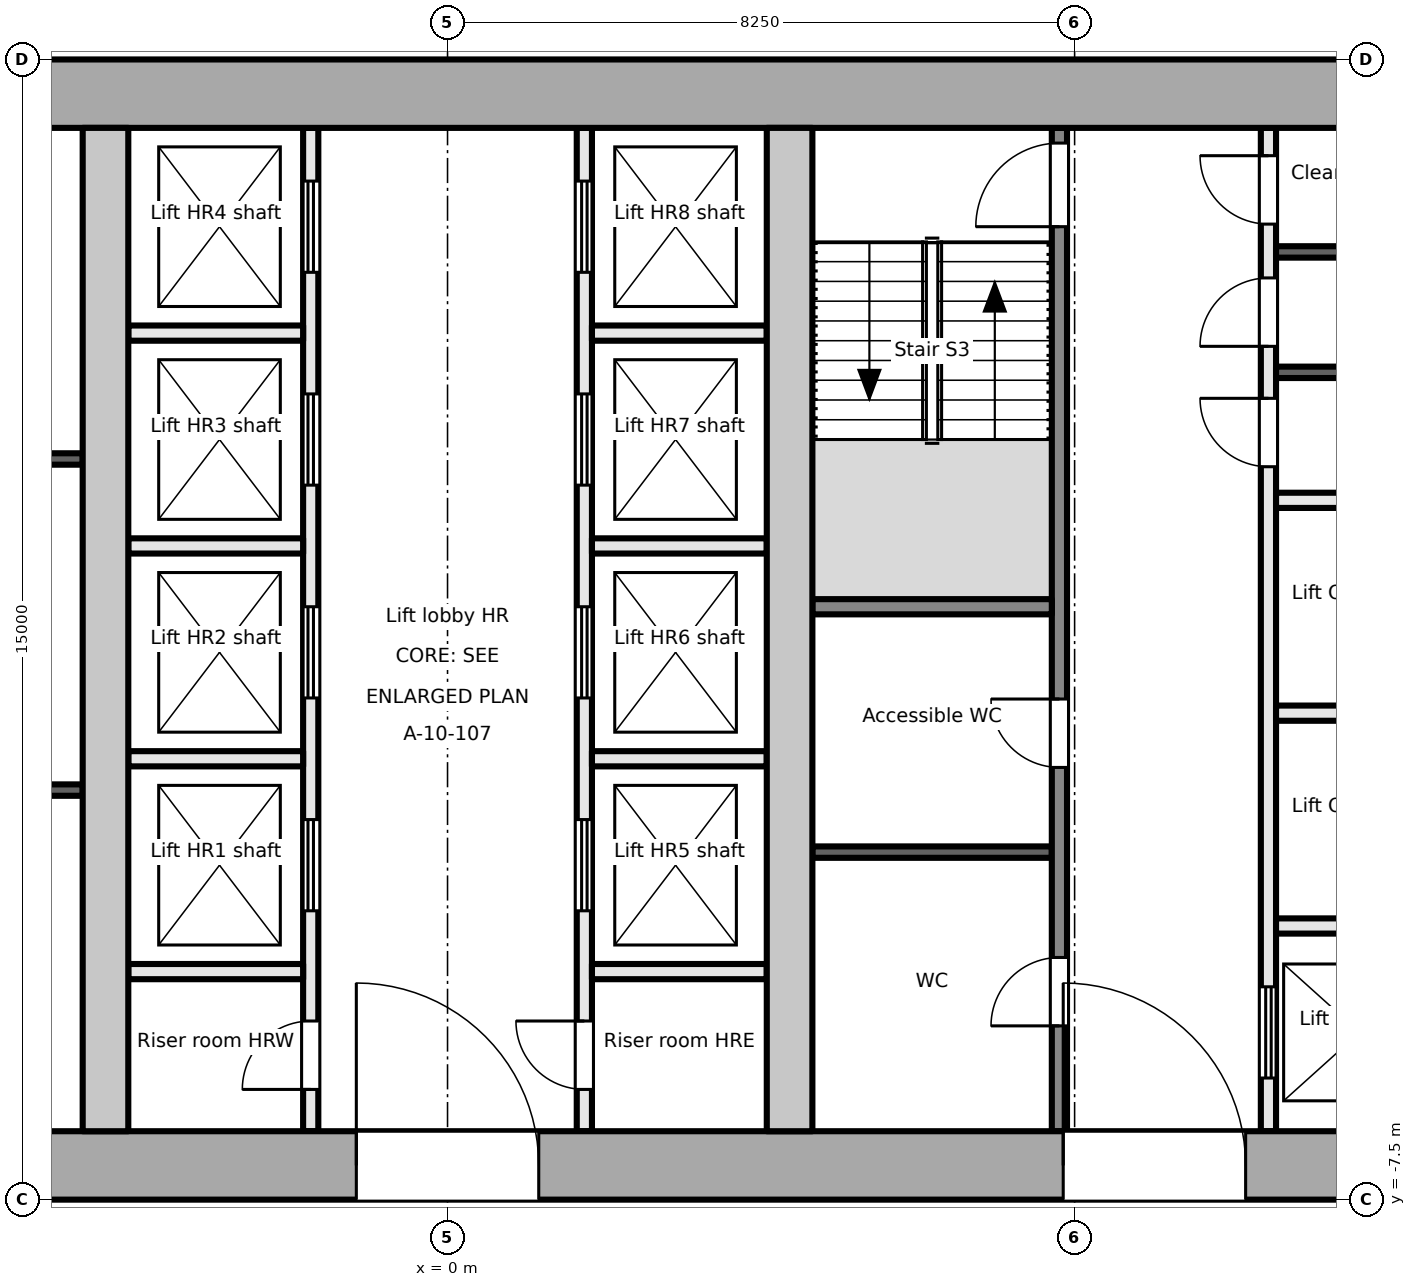
"""IFC4 building model, lengths in metres.
Left out: names, types, materials, properties, quantities, classifications, styles, units other than length and angle.
Written with IfcOpenShell. Run it as: python <this file> out.ifc"""

import sys

from ifc_helpers import new_model, si_unit, direction, frame, frame_2d, origin, place, context, subcontext, project, spatial, rectangle, extrude, element, fill, save


model = new_model("IFC4")
c1 = context("Model", 3, precision=1e-05, world=origin(), true_north=direction((0.0, 1.0)))
c2 = subcontext(c1, "Body", "Model", "MODEL_VIEW")
j1 = project(units=[si_unit("LENGTHUNIT", "METRE"), si_unit("PLANEANGLEUNIT", "RADIAN")], contexts=[c1])
p1 = place(None, origin())
s1 = spatial("IfcSite", under=j1, at=p1, CompositionType="ELEMENT")
p2 = place(p1, origin())
s2 = spatial("IfcBuilding", under=s1, at=p2, CompositionType="ELEMENT")
p3 = place(p2, frame((0.0, 0.0, 221.3)))
s3 = spatial("IfcBuildingStorey", under=s2, at=p3, CompositionType="ELEMENT", Elevation=221.3)
p4 = place(p3, frame((-18.0, -7.05, -0.2), z_axis=(0.0, 0.0, 1.0), x_axis=(1.0, 0.0, 0.0)))
e1 = element("IfcWall", 1, at=p4, inside=s3, PredefinedType="SHEAR", context=c2, shape_type="SweptSolid", body=[
    extrude(rectangle(XDim=36.0, YDim=0.9, at=frame_2d((18.0, 0.0))), origin(), (0.0, 0.0, 1.0), 3.9),
])
p5 = place(p4, frame((4.9, 0.0, 0.2)))
e2 = element("IfcOpeningElement", 2, at=p5, cuts=e1, PredefinedType="OPENING", context=c2, shape_type="SweptSolid", body=[
    extrude(rectangle(XDim=1.8, YDim=2.1, at=frame_2d((0.9, 1.05))), frame((0.0, 0.46, 0.0), z_axis=(0.0, -1.0, 0.0), x_axis=(1.0, 0.0, 0.0)), (0.0, 0.0, 1.0), 0.921),
])
p6 = place(p4, frame((16.8, 0.0, 0.2)))
e3 = element("IfcOpeningElement", 3, at=p6, cuts=e1, PredefinedType="OPENING", context=c2, shape_type="SweptSolid", body=[
    extrude(rectangle(XDim=2.4, YDim=2.1, at=frame_2d((1.2, 1.05))), frame((0.0, 0.46, 0.0), z_axis=(0.0, -1.0, 0.0), x_axis=(1.0, 0.0, 0.0)), (0.0, 0.0, 1.0), 0.921),
])
p7 = place(p4, frame((26.1, 0.0, 0.2)))
e4 = element("IfcOpeningElement", 4, at=p7, cuts=e1, PredefinedType="OPENING", context=c2, shape_type="SweptSolid", body=[
    extrude(rectangle(XDim=2.4, YDim=2.1, at=frame_2d((1.2, 1.05))), frame((0.0, 0.46, 0.0), z_axis=(0.0, -1.0, 0.0), x_axis=(1.0, 0.0, 0.0)), (0.0, 0.0, 1.0), 0.921),
])
p8 = place(p3, frame((-18.0, 7.05, -0.2), z_axis=(0.0, 0.0, 1.0), x_axis=(1.0, 0.0, 0.0)))
e5 = element("IfcWall", 5, at=p8, inside=s3, PredefinedType="SHEAR", context=c2, shape_type="SweptSolid", body=[
    extrude(rectangle(XDim=36.0, YDim=0.9, at=frame_2d((18.0, 0.0))), origin(), (0.0, 0.0, 1.0), 3.9),
])
for number, where, z_axis, x_axis in (
    (6, (-4.5, -6.6, -0.2), (0.0, 0.0, 1.0), (0.0, 1.0, 0.0)),
    (7, (4.5, -6.6, -0.2), (0.0, 0.0, 1.0), (0.0, 1.0, 0.0)),
):
    element("IfcWall", number, at=place(p3, frame(where, z_axis=z_axis, x_axis=x_axis)), inside=s3, PredefinedType="SHEAR", context=c2, shape_type="SweptSolid", body=[
        extrude(rectangle(XDim=13.2, YDim=0.6, at=frame_2d((6.6, 0.0))), origin(), (0.0, 0.0, 1.0), 3.9),
    ])
for number, where, z_axis, x_axis in (
    (8, (-11.05, -2.112, 0.0), (0.0, 0.0, 1.0), (1.0, 0.0, 0.0)),
    (9, (-11.05, 2.244, 0.0), (0.0, 0.0, 1.0), (1.0, 0.0, 0.0)),
):
    element("IfcWall", number, at=place(p3, frame(where, z_axis=z_axis, x_axis=x_axis)), inside=s3, PredefinedType="PARTITIONING", context=c2, shape_type="SweptSolid", body=[
        extrude(rectangle(XDim=6.25, YDim=0.15, at=frame_2d((3.125, 0.0))), origin(), (0.0, 0.0, 1.0), 3.7),
    ])
p9 = place(p3, frame((-1.8, -6.6, 0.0), z_axis=(0.0, 0.0, 1.0), x_axis=(0.0, 1.0, 0.0)))
e10 = element("IfcWall", 10, at=p9, inside=s3, PredefinedType="PARTITIONING", context=c2, shape_type="SweptSolid", body=[
    extrude(rectangle(XDim=13.2, YDim=0.2, at=frame_2d((6.6, 0.0))), origin(), (0.0, 0.0, 1.0), 3.7),
])
p10 = place(p9, frame((0.55, 0.0, 0.0)))
e11 = element("IfcOpeningElement", 11, at=p10, cuts=e10, PredefinedType="OPENING", context=c2, shape_type="SweptSolid", body=[
    extrude(rectangle(XDim=0.9, YDim=2.1, at=frame_2d((0.45, 1.05))), frame((0.0, 0.111, 0.0), z_axis=(0.0, -1.0, 0.0), x_axis=(1.0, 0.0, 0.0)), (0.0, 0.0, 1.0), 0.221),
])
p11 = place(p9, frame((2.9, 0.0, 0.0)))
e12 = element("IfcOpeningElement", 12, at=p11, cuts=e10, PredefinedType="OPENING", context=c2, shape_type="SweptSolid", body=[
    extrude(rectangle(XDim=1.2, YDim=2.1, at=frame_2d((0.6, 1.05))), frame((0.0, 0.111, 0.0), z_axis=(0.0, -1.0, 0.0), x_axis=(1.0, 0.0, 0.0)), (0.0, 0.0, 1.0), 0.221),
])
p12 = place(p9, frame((5.7, 0.0, 0.0)))
e13 = element("IfcOpeningElement", 13, at=p12, cuts=e10, PredefinedType="OPENING", context=c2, shape_type="SweptSolid", body=[
    extrude(rectangle(XDim=1.2, YDim=2.1, at=frame_2d((0.6, 1.05))), frame((0.0, 0.111, 0.0), z_axis=(0.0, -1.0, 0.0), x_axis=(1.0, 0.0, 0.0)), (0.0, 0.0, 1.0), 0.221),
])
p13 = place(p9, frame((8.5, 0.0, 0.0)))
e14 = element("IfcOpeningElement", 14, at=p13, cuts=e10, PredefinedType="OPENING", context=c2, shape_type="SweptSolid", body=[
    extrude(rectangle(XDim=1.2, YDim=2.1, at=frame_2d((0.6, 1.05))), frame((0.0, 0.111, 0.0), z_axis=(0.0, -1.0, 0.0), x_axis=(1.0, 0.0, 0.0)), (0.0, 0.0, 1.0), 0.221),
])
p14 = place(p9, frame((11.3, 0.0, 0.0)))
e15 = element("IfcOpeningElement", 15, at=p14, cuts=e10, PredefinedType="OPENING", context=c2, shape_type="SweptSolid", body=[
    extrude(rectangle(XDim=1.2, YDim=2.1, at=frame_2d((0.6, 1.05))), frame((0.0, 0.111, 0.0), z_axis=(0.0, -1.0, 0.0), x_axis=(1.0, 0.0, 0.0)), (0.0, 0.0, 1.0), 0.221),
])
p15 = place(p3, frame((1.8, -6.6, 0.0), z_axis=(0.0, 0.0, 1.0), x_axis=(0.0, 1.0, 0.0)))
e16 = element("IfcWall", 16, at=p15, inside=s3, PredefinedType="PARTITIONING", context=c2, shape_type="SweptSolid", body=[
    extrude(rectangle(XDim=13.2, YDim=0.2, at=frame_2d((6.6, 0.0))), origin(), (0.0, 0.0, 1.0), 3.7),
])
p16 = place(p15, frame((0.55, 0.0, 0.0)))
e17 = element("IfcOpeningElement", 17, at=p16, cuts=e16, PredefinedType="OPENING", context=c2, shape_type="SweptSolid", body=[
    extrude(rectangle(XDim=0.9, YDim=2.1, at=frame_2d((0.45, 1.05))), frame((0.0, 0.111, 0.0), z_axis=(0.0, -1.0, 0.0), x_axis=(1.0, 0.0, 0.0)), (0.0, 0.0, 1.0), 0.221),
])
p17 = place(p15, frame((2.9, 0.0, 0.0)))
e18 = element("IfcOpeningElement", 18, at=p17, cuts=e16, PredefinedType="OPENING", context=c2, shape_type="SweptSolid", body=[
    extrude(rectangle(XDim=1.2, YDim=2.1, at=frame_2d((0.6, 1.05))), frame((0.0, 0.111, 0.0), z_axis=(0.0, -1.0, 0.0), x_axis=(1.0, 0.0, 0.0)), (0.0, 0.0, 1.0), 0.221),
])
p18 = place(p15, frame((5.7, 0.0, 0.0)))
e19 = element("IfcOpeningElement", 19, at=p18, cuts=e16, PredefinedType="OPENING", context=c2, shape_type="SweptSolid", body=[
    extrude(rectangle(XDim=1.2, YDim=2.1, at=frame_2d((0.6, 1.05))), frame((0.0, 0.111, 0.0), z_axis=(0.0, -1.0, 0.0), x_axis=(1.0, 0.0, 0.0)), (0.0, 0.0, 1.0), 0.221),
])
p19 = place(p15, frame((8.5, 0.0, 0.0)))
e20 = element("IfcOpeningElement", 20, at=p19, cuts=e16, PredefinedType="OPENING", context=c2, shape_type="SweptSolid", body=[
    extrude(rectangle(XDim=1.2, YDim=2.1, at=frame_2d((0.6, 1.05))), frame((0.0, 0.111, 0.0), z_axis=(0.0, -1.0, 0.0), x_axis=(1.0, 0.0, 0.0)), (0.0, 0.0, 1.0), 0.221),
])
p20 = place(p15, frame((11.3, 0.0, 0.0)))
e21 = element("IfcOpeningElement", 21, at=p20, cuts=e16, PredefinedType="OPENING", context=c2, shape_type="SweptSolid", body=[
    extrude(rectangle(XDim=1.2, YDim=2.1, at=frame_2d((0.6, 1.05))), frame((0.0, 0.111, 0.0), z_axis=(0.0, -1.0, 0.0), x_axis=(1.0, 0.0, 0.0)), (0.0, 0.0, 1.0), 0.221),
])
for number, where, z_axis, x_axis in (
    (22, (-4.2, -1.7, 0.0), (0.0, 0.0, 1.0), (1.0, 0.0, 0.0)),
    (23, (-4.2, 1.1, 0.0), (0.0, 0.0, 1.0), (1.0, 0.0, 0.0)),
    (24, (-4.2, 3.9, 0.0), (0.0, 0.0, 1.0), (1.0, 0.0, 0.0)),
    (25, (-4.2, -4.5, 0.0), (0.0, 0.0, 1.0), (1.0, 0.0, 0.0)),
    (26, (1.9, -1.7, 0.0), (0.0, 0.0, 1.0), (1.0, 0.0, 0.0)),
    (27, (1.9, 1.1, 0.0), (0.0, 0.0, 1.0), (1.0, 0.0, 0.0)),
    (28, (1.9, 3.9, 0.0), (0.0, 0.0, 1.0), (1.0, 0.0, 0.0)),
    (29, (1.9, -4.5, 0.0), (0.0, 0.0, 1.0), (1.0, 0.0, 0.0)),
):
    element("IfcWall", number, at=place(p3, frame(where, z_axis=z_axis, x_axis=x_axis)), inside=s3, PredefinedType="PARTITIONING", context=c2, shape_type="SweptSolid", body=[
        extrude(rectangle(XDim=2.3, YDim=0.2, at=frame_2d((1.15, 0.0))), origin(), (0.0, 0.0, 1.0), 3.7),
    ])
p21 = place(p3, frame((8.05, -6.6, 0.0), z_axis=(0.0, 0.0, 1.0), x_axis=(0.0, 1.0, 0.0)))
e30 = element("IfcWall", 30, at=p21, inside=s3, PredefinedType="PARTITIONING", context=c2, shape_type="SweptSolid", body=[
    extrude(rectangle(XDim=13.2, YDim=0.2, at=frame_2d((6.6, 0.0))), origin(), (0.0, 0.0, 1.0), 3.7),
])
p22 = place(p21, frame((1.386, 0.0, 0.0)))
e31 = element("IfcOpeningElement", 31, at=p22, cuts=e30, PredefinedType="OPENING", context=c2, shape_type="SweptSolid", body=[
    extrude(rectangle(XDim=0.9, YDim=2.1, at=frame_2d((0.45, 1.05))), frame((0.0, 0.111, 0.0), z_axis=(0.0, -1.0, 0.0), x_axis=(1.0, 0.0, 0.0)), (0.0, 0.0, 1.0), 0.221),
])
p23 = place(p21, frame((4.786, 0.0, 0.0)))
e32 = element("IfcOpeningElement", 32, at=p23, cuts=e30, PredefinedType="OPENING", context=c2, shape_type="SweptSolid", body=[
    extrude(rectangle(XDim=0.9, YDim=2.1, at=frame_2d((0.45, 1.05))), frame((0.0, 0.111, 0.0), z_axis=(0.0, -1.0, 0.0), x_axis=(1.0, 0.0, 0.0)), (0.0, 0.0, 1.0), 0.221),
])
p24 = place(p21, frame((11.9, 0.0, 0.0)))
e33 = element("IfcOpeningElement", 33, at=p24, cuts=e30, PredefinedType="OPENING", context=c2, shape_type="SweptSolid", body=[
    extrude(rectangle(XDim=1.1, YDim=2.1, at=frame_2d((0.55, 1.05))), frame((0.0, 0.111, 0.0), z_axis=(0.0, -1.0, 0.0), x_axis=(1.0, 0.0, 0.0)), (0.0, 0.0, 1.0), 0.221),
])
p25 = place(p3, frame((10.8, -6.6, 0.0), z_axis=(0.0, 0.0, 1.0), x_axis=(0.0, 1.0, 0.0)))
e34 = element("IfcWall", 34, at=p25, inside=s3, PredefinedType="PARTITIONING", context=c2, shape_type="SweptSolid", body=[
    extrude(rectangle(XDim=13.2, YDim=0.2, at=frame_2d((6.6, 0.0))), origin(), (0.0, 0.0, 1.0), 3.7),
])
p26 = place(p25, frame((0.7, 0.0, 0.0)))
e35 = element("IfcOpeningElement", 35, at=p26, cuts=e34, PredefinedType="OPENING", context=c2, shape_type="SweptSolid", body=[
    extrude(rectangle(XDim=1.2, YDim=2.1, at=frame_2d((0.6, 1.05))), frame((0.0, 0.111, 0.0), z_axis=(0.0, -1.0, 0.0), x_axis=(1.0, 0.0, 0.0)), (0.0, 0.0, 1.0), 0.221),
])
p27 = place(p25, frame((8.742, 0.0, 0.0)))
e36 = element("IfcOpeningElement", 36, at=p27, cuts=e34, PredefinedType="OPENING", context=c2, shape_type="SweptSolid", body=[
    extrude(rectangle(XDim=0.9, YDim=2.1, at=frame_2d((0.45, 1.05))), frame((0.0, 0.111, 0.0), z_axis=(0.0, -1.0, 0.0), x_axis=(1.0, 0.0, 0.0)), (0.0, 0.0, 1.0), 0.221),
])
p28 = place(p25, frame((10.326, 0.0, 0.0)))
e37 = element("IfcOpeningElement", 37, at=p28, cuts=e34, PredefinedType="OPENING", context=c2, shape_type="SweptSolid", body=[
    extrude(rectangle(XDim=0.9, YDim=2.1, at=frame_2d((0.45, 1.05))), frame((0.0, 0.111, 0.0), z_axis=(0.0, -1.0, 0.0), x_axis=(1.0, 0.0, 0.0)), (0.0, 0.0, 1.0), 0.221),
])
p29 = place(p25, frame((11.934, 0.0, 0.0)))
e38 = element("IfcOpeningElement", 38, at=p29, cuts=e34, PredefinedType="OPENING", context=c2, shape_type="SweptSolid", body=[
    extrude(rectangle(XDim=0.9, YDim=2.1, at=frame_2d((0.45, 1.05))), frame((0.0, 0.111, 0.0), z_axis=(0.0, -1.0, 0.0), x_axis=(1.0, 0.0, 0.0)), (0.0, 0.0, 1.0), 0.221),
])
p30 = place(p3, frame((4.8, 0.3, 0.0), z_axis=(0.0, 0.0, 1.0), x_axis=(1.0, 0.0, 0.0)))
e39 = element("IfcWall", 39, at=p30, inside=s3, PredefinedType="PARTITIONING", context=c2, shape_type="SweptSolid", body=[
    extrude(rectangle(XDim=3.15, YDim=0.2, at=frame_2d((1.575, 0.0))), origin(), (0.0, 0.0, 1.0), 3.7),
])
p31 = place(p3, frame((4.8, -2.928, 0.0), z_axis=(0.0, 0.0, 1.0), x_axis=(1.0, 0.0, 0.0)))
e40 = element("IfcWall", 40, at=p31, inside=s3, PredefinedType="PARTITIONING", context=c2, shape_type="SweptSolid", body=[
    extrude(rectangle(XDim=3.15, YDim=0.15, at=frame_2d((1.575, 0.0))), origin(), (0.0, 0.0, 1.0), 3.7),
])
for number, where, z_axis, x_axis in (
    (41, (10.9, -3.9, 0.0), (0.0, 0.0, 1.0), (1.0, 0.0, 0.0)),
    (42, (10.9, -1.1, 0.0), (0.0, 0.0, 1.0), (1.0, 0.0, 0.0)),
    (43, (10.9, 1.7, 0.0), (0.0, 0.0, 1.0), (1.0, 0.0, 0.0)),
):
    element("IfcWall", number, at=place(p3, frame(where, z_axis=z_axis, x_axis=x_axis)), inside=s3, PredefinedType="PARTITIONING", context=c2, shape_type="SweptSolid", body=[
        extrude(rectangle(XDim=2.3, YDim=0.2, at=frame_2d((1.15, 0.0))), origin(), (0.0, 0.0, 1.0), 3.7),
    ])
for number, where, z_axis, x_axis in (
    (44, (10.9, 3.384, 0.0), (0.0, 0.0, 1.0), (1.0, 0.0, 0.0)),
    (45, (10.9, 4.968, 0.0), (0.0, 0.0, 1.0), (1.0, 0.0, 0.0)),
):
    element("IfcWall", number, at=place(p3, frame(where, z_axis=z_axis, x_axis=x_axis)), inside=s3, PredefinedType="PARTITIONING", context=c2, shape_type="SweptSolid", body=[
        extrude(rectangle(XDim=2.3, YDim=0.15, at=frame_2d((1.15, 0.0))), origin(), (0.0, 0.0, 1.0), 3.7),
    ])
p32 = place(p10, origin())
e46 = element("IfcDoor", 46, at=p32, inside=s3, OperationType="SINGLE_SWING_LEFT", PredefinedType="DOOR", context=c2, shape_type="SweptSolid", body=[
    extrude(rectangle(XDim=0.9, YDim=2.1, at=frame_2d((0.45, 1.05))), frame((0.0, 0.025, 0.0), z_axis=(0.0, -1.0, 0.0), x_axis=(1.0, 0.0, 0.0)), (0.0, 0.0, 1.0), 0.05),
])
fill(e11, e46)
p33 = place(p11, origin())
e47 = element("IfcDoor", 47, at=p33, inside=s3, OperationType="DOUBLE_DOOR_SLIDING", PredefinedType="DOOR", context=c2, shape_type="SweptSolid", body=[
    extrude(rectangle(XDim=1.2, YDim=2.1, at=frame_2d((0.6, 1.05))), frame((0.0, 0.025, 0.0), z_axis=(0.0, -1.0, 0.0), x_axis=(1.0, 0.0, 0.0)), (0.0, 0.0, 1.0), 0.05),
])
fill(e12, e47)
p34 = place(p12, origin())
e48 = element("IfcDoor", 48, at=p34, inside=s3, OperationType="DOUBLE_DOOR_SLIDING", PredefinedType="DOOR", context=c2, shape_type="SweptSolid", body=[
    extrude(rectangle(XDim=1.2, YDim=2.1, at=frame_2d((0.6, 1.05))), frame((0.0, 0.025, 0.0), z_axis=(0.0, -1.0, 0.0), x_axis=(1.0, 0.0, 0.0)), (0.0, 0.0, 1.0), 0.05),
])
fill(e13, e48)
p35 = place(p13, origin())
e49 = element("IfcDoor", 49, at=p35, inside=s3, OperationType="DOUBLE_DOOR_SLIDING", PredefinedType="DOOR", context=c2, shape_type="SweptSolid", body=[
    extrude(rectangle(XDim=1.2, YDim=2.1, at=frame_2d((0.6, 1.05))), frame((0.0, 0.025, 0.0), z_axis=(0.0, -1.0, 0.0), x_axis=(1.0, 0.0, 0.0)), (0.0, 0.0, 1.0), 0.05),
])
fill(e14, e49)
p36 = place(p14, origin())
e50 = element("IfcDoor", 50, at=p36, inside=s3, OperationType="DOUBLE_DOOR_SLIDING", PredefinedType="DOOR", context=c2, shape_type="SweptSolid", body=[
    extrude(rectangle(XDim=1.2, YDim=2.1, at=frame_2d((0.6, 1.05))), frame((0.0, 0.025, 0.0), z_axis=(0.0, -1.0, 0.0), x_axis=(1.0, 0.0, 0.0)), (0.0, 0.0, 1.0), 0.05),
])
fill(e15, e50)
p37 = place(p16, origin())
e51 = element("IfcDoor", 51, at=p37, inside=s3, OperationType="SINGLE_SWING_RIGHT", PredefinedType="DOOR", context=c2, shape_type="SweptSolid", body=[
    extrude(rectangle(XDim=0.9, YDim=2.1, at=frame_2d((0.45, 1.05))), frame((0.0, 0.025, 0.0), z_axis=(0.0, -1.0, 0.0), x_axis=(1.0, 0.0, 0.0)), (0.0, 0.0, 1.0), 0.05),
])
fill(e17, e51)
p38 = place(p17, origin())
e52 = element("IfcDoor", 52, at=p38, inside=s3, OperationType="DOUBLE_DOOR_SLIDING", PredefinedType="DOOR", context=c2, shape_type="SweptSolid", body=[
    extrude(rectangle(XDim=1.2, YDim=2.1, at=frame_2d((0.6, 1.05))), frame((0.0, 0.025, 0.0), z_axis=(0.0, -1.0, 0.0), x_axis=(1.0, 0.0, 0.0)), (0.0, 0.0, 1.0), 0.05),
])
fill(e18, e52)
p39 = place(p18, origin())
e53 = element("IfcDoor", 53, at=p39, inside=s3, OperationType="DOUBLE_DOOR_SLIDING", PredefinedType="DOOR", context=c2, shape_type="SweptSolid", body=[
    extrude(rectangle(XDim=1.2, YDim=2.1, at=frame_2d((0.6, 1.05))), frame((0.0, 0.025, 0.0), z_axis=(0.0, -1.0, 0.0), x_axis=(1.0, 0.0, 0.0)), (0.0, 0.0, 1.0), 0.05),
])
fill(e19, e53)
p40 = place(p19, origin())
e54 = element("IfcDoor", 54, at=p40, inside=s3, OperationType="DOUBLE_DOOR_SLIDING", PredefinedType="DOOR", context=c2, shape_type="SweptSolid", body=[
    extrude(rectangle(XDim=1.2, YDim=2.1, at=frame_2d((0.6, 1.05))), frame((0.0, 0.025, 0.0), z_axis=(0.0, -1.0, 0.0), x_axis=(1.0, 0.0, 0.0)), (0.0, 0.0, 1.0), 0.05),
])
fill(e20, e54)
p41 = place(p20, origin())
e55 = element("IfcDoor", 55, at=p41, inside=s3, OperationType="DOUBLE_DOOR_SLIDING", PredefinedType="DOOR", context=c2, shape_type="SweptSolid", body=[
    extrude(rectangle(XDim=1.2, YDim=2.1, at=frame_2d((0.6, 1.05))), frame((0.0, 0.025, 0.0), z_axis=(0.0, -1.0, 0.0), x_axis=(1.0, 0.0, 0.0)), (0.0, 0.0, 1.0), 0.05),
])
fill(e21, e55)
p42 = place(p6, origin())
e56 = element("IfcDoor", 56, at=p42, inside=s3, OperationType="DOUBLE_DOOR_DOUBLE_SWING", PredefinedType="DOOR", context=c2, shape_type="SweptSolid", body=[
    extrude(rectangle(XDim=2.4, YDim=2.1, at=frame_2d((1.2, 1.05))), frame((0.0, 0.025, 0.0), z_axis=(0.0, -1.0, 0.0), x_axis=(1.0, 0.0, 0.0)), (0.0, 0.0, 1.0), 0.05),
])
fill(e3, e56)
p43 = place(p22, origin())
e57 = element("IfcDoor", 57, at=p43, inside=s3, OperationType="SINGLE_SWING_LEFT", PredefinedType="DOOR", context=c2, shape_type="SweptSolid", body=[
    extrude(rectangle(XDim=0.9, YDim=2.1, at=frame_2d((0.45, 1.05))), frame((0.0, 0.025, 0.0), z_axis=(0.0, -1.0, 0.0), x_axis=(1.0, 0.0, 0.0)), (0.0, 0.0, 1.0), 0.05),
])
fill(e31, e57)
p44 = place(p23, origin())
e58 = element("IfcDoor", 58, at=p44, inside=s3, OperationType="SINGLE_SWING_RIGHT", PredefinedType="DOOR", context=c2, shape_type="SweptSolid", body=[
    extrude(rectangle(XDim=0.9, YDim=2.1, at=frame_2d((0.45, 1.05))), frame((0.0, 0.025, 0.0), z_axis=(0.0, -1.0, 0.0), x_axis=(1.0, 0.0, 0.0)), (0.0, 0.0, 1.0), 0.05),
])
fill(e32, e58)
p45 = place(p24, origin())
e59 = element("IfcDoor", 59, at=p45, inside=s3, OperationType="SINGLE_SWING_LEFT", PredefinedType="DOOR", context=c2, shape_type="SweptSolid", body=[
    extrude(rectangle(XDim=1.1, YDim=2.1, at=frame_2d((0.55, 1.05))), frame((0.0, 0.025, 0.0), z_axis=(0.0, -1.0, 0.0), x_axis=(1.0, 0.0, 0.0)), (0.0, 0.0, 1.0), 0.05),
])
fill(e33, e59)
p46 = place(p7, origin())
e60 = element("IfcDoor", 60, at=p46, inside=s3, OperationType="DOUBLE_DOOR_DOUBLE_SWING", PredefinedType="DOOR", context=c2, shape_type="SweptSolid", body=[
    extrude(rectangle(XDim=2.4, YDim=2.1, at=frame_2d((1.2, 1.05))), frame((0.0, 0.025, 0.0), z_axis=(0.0, -1.0, 0.0), x_axis=(1.0, 0.0, 0.0)), (0.0, 0.0, 1.0), 0.05),
])
fill(e4, e60)
p47 = place(p26, origin())
e61 = element("IfcDoor", 61, at=p47, inside=s3, OperationType="DOUBLE_DOOR_SLIDING", PredefinedType="DOOR", context=c2, shape_type="SweptSolid", body=[
    extrude(rectangle(XDim=1.2, YDim=2.1, at=frame_2d((0.6, 1.05))), frame((0.0, 0.025, 0.0), z_axis=(0.0, -1.0, 0.0), x_axis=(1.0, 0.0, 0.0)), (0.0, 0.0, 1.0), 0.05),
])
fill(e35, e61)
p48 = place(p27, origin())
e62 = element("IfcDoor", 62, at=p48, inside=s3, OperationType="SINGLE_SWING_RIGHT", PredefinedType="DOOR", context=c2, shape_type="SweptSolid", body=[
    extrude(rectangle(XDim=0.9, YDim=2.1, at=frame_2d((0.45, 1.05))), frame((0.0, 0.025, 0.0), z_axis=(0.0, -1.0, 0.0), x_axis=(1.0, 0.0, 0.0)), (0.0, 0.0, 1.0), 0.05),
])
fill(e36, e62)
p49 = place(p28, origin())
e63 = element("IfcDoor", 63, at=p49, inside=s3, OperationType="SINGLE_SWING_LEFT", PredefinedType="DOOR", context=c2, shape_type="SweptSolid", body=[
    extrude(rectangle(XDim=0.9, YDim=2.1, at=frame_2d((0.45, 1.05))), frame((0.0, 0.025, 0.0), z_axis=(0.0, -1.0, 0.0), x_axis=(1.0, 0.0, 0.0)), (0.0, 0.0, 1.0), 0.05),
])
fill(e37, e63)
p50 = place(p29, origin())
e64 = element("IfcDoor", 64, at=p50, inside=s3, OperationType="SINGLE_SWING_RIGHT", PredefinedType="DOOR", context=c2, shape_type="SweptSolid", body=[
    extrude(rectangle(XDim=0.9, YDim=2.1, at=frame_2d((0.45, 1.05))), frame((0.0, 0.025, 0.0), z_axis=(0.0, -1.0, 0.0), x_axis=(1.0, 0.0, 0.0)), (0.0, 0.0, 1.0), 0.05),
])
fill(e38, e64)
save(model, sys.argv[1])
